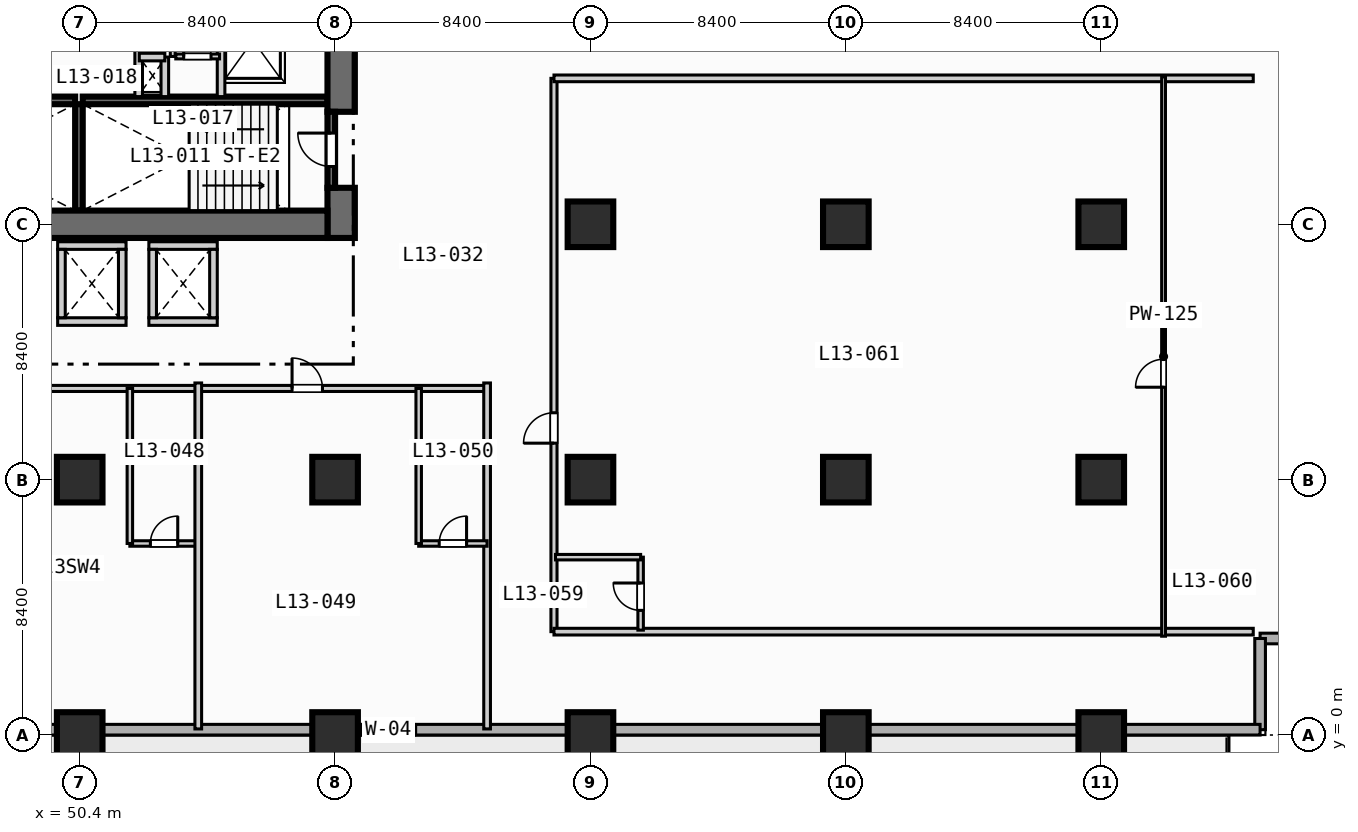
"""IFC4 building model, lengths in metres.
Left out: names, types, materials, properties, quantities, classifications, styles, units other than length and angle.
Written with IfcOpenShell. Run it as: python <this file> out.ifc"""

import sys

from ifc_helpers import new_model, si_unit, direction, frame, frame_2d, origin, origin_2d, place, context, subcontext, project, spatial, rectangle, extrude, element, fill, save


model = new_model("IFC4")
c1 = context("Model", 3, precision=1e-05, world=origin(), true_north=direction((0.0, 1.0)))
c2 = subcontext(c1, "Body", "Model", "MODEL_VIEW")
j1 = project(units=[si_unit("LENGTHUNIT", "METRE"), si_unit("PLANEANGLEUNIT", "RADIAN")], contexts=[c1])
p1 = place(None, origin())
s1 = spatial("IfcSite", under=j1, at=p1, CompositionType="ELEMENT")
p2 = place(p1, origin())
s2 = spatial("IfcBuilding", under=s1, at=p2, CompositionType="ELEMENT")
p3 = place(p2, frame((0.0, 0.0, 58.6)))
s3 = spatial("IfcBuildingStorey", under=s2, at=p3, CompositionType="ELEMENT", Elevation=58.6)
for number, where, z_axis, x_axis in (
    (1, (42.2, 20.875, 0.0), (0.0, 0.0, 1.0), (1.0, 0.0, 0.0)),
    (2, (50.5, 20.875, 0.0), (0.0, 0.0, 1.0), (1.0, 0.0, 0.0)),
):
    element("IfcWall", number, at=place(p3, frame(where, z_axis=z_axis, x_axis=x_axis)), inside=s3, PredefinedType="SOLIDWALL", context=c2, shape_type="SweptSolid", body=[
        extrude(rectangle(XDim=8.05, YDim=0.25, at=frame_2d((4.025, 0.0))), origin(), (0.0, 0.0, 1.0), 3.55),
    ])
p4 = place(p3, frame((50.375, 17.25, 0.0), z_axis=(0.0, 0.0, 1.0), x_axis=(0.0, 1.0, 0.0)))
e3 = element("IfcWall", 3, at=p4, inside=s3, PredefinedType="SOLIDWALL", context=c2, shape_type="SweptSolid", body=[
    extrude(rectangle(XDim=3.5, YDim=0.25, at=frame_2d((1.75, 0.0))), origin(), (0.0, 0.0, 1.0), 3.55),
])
p5 = place(p3, frame((59.0, 16.35, 0.0), z_axis=(0.0, 0.0, 1.0), x_axis=(0.0, 1.0, 0.0)))
e4 = element("IfcWall", 4, at=p5, inside=s3, PredefinedType="SHEAR", context=c2, shape_type="SweptSolid", body=[
    extrude(rectangle(XDim=1.65, YDim=0.9, at=frame_2d((0.825, 0.0))), origin(), (0.0, 0.0, 1.0), 3.55),
])
p6 = place(p3, frame((59.0, 20.5, 0.0), z_axis=(0.0, 0.0, 1.0), x_axis=(0.0, 1.0, 0.0)))
e5 = element("IfcWall", 5, at=p6, inside=s3, PredefinedType="SHEAR", context=c2, shape_type="SweptSolid", body=[
    extrude(rectangle(XDim=5.15, YDim=0.9, at=frame_2d((2.575, 0.0))), origin(), (0.0, 0.0, 1.0), 3.55),
])
p7 = place(p3, frame((42.2, 16.8, 0.0), z_axis=(0.0, 0.0, 1.0), x_axis=(1.0, 0.0, 0.0)))
e6 = element("IfcWall", 6, at=p7, inside=s3, PredefinedType="SHEAR", context=c2, shape_type="SweptSolid", body=[
    extrude(rectangle(XDim=16.35, YDim=0.9, at=frame_2d((8.175, 0.0))), origin(), (0.0, 0.0, 1.0), 3.55),
])
for number, where, z_axis, x_axis in (
    (7, (50.4, 0.0, 0.0), (0.0, 0.0, 1.0), (1.0, 0.0, 0.0)),
    (8, (50.4, 8.4, 0.0), (0.0, 0.0, 1.0), (1.0, 0.0, 0.0)),
    (9, (58.8, 0.0, 0.0), (0.0, 0.0, 1.0), (1.0, 0.0, 0.0)),
    (10, (58.8, 8.4, 0.0), (0.0, 0.0, 1.0), (1.0, 0.0, 0.0)),
    (11, (67.2, 0.0, 0.0), (0.0, 0.0, 1.0), (1.0, 0.0, 0.0)),
    (12, (67.2, 8.4, 0.0), (0.0, 0.0, 1.0), (1.0, 0.0, 0.0)),
    (13, (67.2, 16.8, 0.0), (0.0, 0.0, 1.0), (1.0, 0.0, 0.0)),
    (14, (75.6, 0.0, 0.0), (0.0, 0.0, 1.0), (1.0, 0.0, 0.0)),
    (15, (75.6, 8.4, 0.0), (0.0, 0.0, 1.0), (1.0, 0.0, 0.0)),
    (16, (75.6, 16.8, 0.0), (0.0, 0.0, 1.0), (1.0, 0.0, 0.0)),
    (17, (84.0, 0.0, 0.0), (0.0, 0.0, 1.0), (1.0, 0.0, 0.0)),
    (18, (84.0, 8.4, 0.0), (0.0, 0.0, 1.0), (1.0, 0.0, 0.0)),
    (19, (84.0, 16.8, 0.0), (0.0, 0.0, 1.0), (1.0, 0.0, 0.0)),
):
    element("IfcColumn", number, at=place(p3, frame(where, z_axis=z_axis, x_axis=x_axis)), inside=s3, PredefinedType="COLUMN", context=c2, shape_type="SweptSolid", body=[
        extrude(rectangle(XDim=1.5, YDim=1.5, at=origin_2d()), origin(), (0.0, 0.0, 1.0), 3.8),
    ])
for number, where, z_axis, x_axis in (
    (20, (92.225, 3.175, 0.0), (0.0, 0.0, 1.0), (-1.0, 0.0, 0.0)),
    (21, (89.225, 3.175, 0.0), (0.0, 0.0, 1.0), (0.0, -1.0, 0.0)),
):
    element("IfcWall", number, at=place(p3, frame(where, z_axis=z_axis, x_axis=x_axis)), inside=s3, PredefinedType="STANDARD", context=c2, shape_type="SweptSolid", body=[
        extrude(rectangle(XDim=3.0, YDim=0.35, at=frame_2d((1.5, 0.0))), origin(), (0.0, 0.0, 1.0), 3.55),
    ])
p8 = place(p3, frame((89.225, 0.175, 0.0), z_axis=(0.0, 0.0, 1.0), x_axis=(-1.0, 0.0, 0.0)))
e22 = element("IfcWall", 22, at=p8, inside=s3, PredefinedType="STANDARD", context=c2, shape_type="SweptSolid", body=[
    extrude(rectangle(XDim=86.05, YDim=0.35, at=frame_2d((43.025, 0.0))), origin(), (0.0, 0.0, 1.0), 3.55),
])
p9 = place(p8, frame((69.025, 0.0, 0.0)))
e23 = element("IfcOpeningElement", 23, at=p9, cuts=e22, PredefinedType="OPENING", context=c2, shape_type="SweptSolid", body=[
    extrude(rectangle(XDim=1.4, YDim=2.2, at=frame_2d((0.7, 1.1))), frame((0.0, 0.185, 0.0), z_axis=(0.0, -1.0, 0.0), x_axis=(1.0, 0.0, 0.0)), (0.0, 0.0, 1.0), 0.37),
])
p10 = place(p8, frame((58.725, 0.0, 0.85)))
e24 = element("IfcOpeningElement", 24, at=p10, cuts=e22, PredefinedType="OPENING", context=c2, shape_type="SweptSolid", body=[
    extrude(rectangle(XDim=2.2, YDim=1.8, at=frame_2d((1.1, 0.9))), frame((0.0, 0.185, 0.0), z_axis=(0.0, -1.0, 0.0), x_axis=(1.0, 0.0, 0.0)), (0.0, 0.0, 1.0), 0.37),
])
p11 = place(p8, frame((50.325, 0.0, 0.85)))
e25 = element("IfcOpeningElement", 25, at=p11, cuts=e22, PredefinedType="OPENING", context=c2, shape_type="SweptSolid", body=[
    extrude(rectangle(XDim=2.2, YDim=1.8, at=frame_2d((1.1, 0.9))), frame((0.0, 0.185, 0.0), z_axis=(0.0, -1.0, 0.0), x_axis=(1.0, 0.0, 0.0)), (0.0, 0.0, 1.0), 0.37),
])
p12 = place(p8, frame((41.925, 0.0, 0.85)))
e26 = element("IfcOpeningElement", 26, at=p12, cuts=e22, PredefinedType="OPENING", context=c2, shape_type="SweptSolid", body=[
    extrude(rectangle(XDim=2.2, YDim=1.8, at=frame_2d((1.1, 0.9))), frame((0.0, 0.185, 0.0), z_axis=(0.0, -1.0, 0.0), x_axis=(1.0, 0.0, 0.0)), (0.0, 0.0, 1.0), 0.37),
])
p13 = place(p8, frame((27.775, 0.0, 0.85)))
e27 = element("IfcOpeningElement", 27, at=p13, cuts=e22, PredefinedType="OPENING", context=c2, shape_type="SweptSolid", body=[
    extrude(rectangle(XDim=1.8, YDim=1.8, at=frame_2d((0.9, 0.9))), frame((0.0, 0.185, 0.0), z_axis=(0.0, -1.0, 0.0), x_axis=(1.0, 0.0, 0.0)), (0.0, 0.0, 1.0), 0.37),
])
p14 = place(p3, frame((58.675, 18.0, 0.0), z_axis=(0.0, 0.0, 1.0), x_axis=(0.0, 1.0, 0.0)))
e28 = element("IfcWall", 28, at=p14, inside=s3, PredefinedType="SOLIDWALL", context=c2, shape_type="SweptSolid", body=[
    extrude(rectangle(XDim=2.5, YDim=0.25, at=frame_2d((1.25, 0.0))), origin(), (0.0, 0.0, 1.0), 3.55),
])
p15 = place(p14, frame((0.7, 0.0, 0.0)))
e29 = element("IfcOpeningElement", 29, at=p15, cuts=e28, PredefinedType="OPENING", context=c2, shape_type="SweptSolid", body=[
    extrude(rectangle(XDim=1.1, YDim=2.15, at=frame_2d((0.55, 1.075))), frame((0.0, 0.135, 0.0), z_axis=(0.0, -1.0, 0.0), x_axis=(1.0, 0.0, 0.0)), (0.0, 0.0, 1.0), 0.27),
])
p16 = place(p3, frame((52.34, 21.0, 0.0), z_axis=(0.0, 0.0, 1.0), x_axis=(0.0, 1.0, 0.0)))
e30 = element("IfcWall", 30, at=p16, inside=s3, PredefinedType="SOLIDWALL", context=c2, shape_type="SweptSolid", body=[
    extrude(rectangle(XDim=3.75, YDim=0.25, at=frame_2d((1.875, 0.0))), origin(), (0.0, 0.0, 1.0), 3.55),
])
p17 = place(p3, frame((55.05, 21.0, 0.0), z_axis=(0.0, 0.0, 1.0), x_axis=(0.0, 1.0, 0.0)))
e31 = element("IfcWall", 31, at=p17, inside=s3, PredefinedType="SOLIDWALL", context=c2, shape_type="SweptSolid", body=[
    extrude(rectangle(XDim=4.15, YDim=0.25, at=frame_2d((2.075, 0.0))), origin(), (0.0, 0.0, 1.0), 3.55),
])
p18 = place(p17, frame((1.85, 0.0, 0.0)))
e32 = element("IfcOpeningElement", 32, at=p18, cuts=e31, PredefinedType="OPENING", context=c2, shape_type="SweptSolid", body=[
    extrude(rectangle(XDim=1.1, YDim=2.15, at=frame_2d((0.55, 1.075))), frame((0.0, 0.135, 0.0), z_axis=(0.0, -1.0, 0.0), x_axis=(1.0, 0.0, 0.0)), (0.0, 0.0, 1.0), 0.27),
])
p19 = place(p3, frame((53.2, 21.0, 0.0), z_axis=(0.0, 0.0, 1.0), x_axis=(0.0, 1.0, 0.0)))
e33 = element("IfcWall", 33, at=p19, inside=s3, PredefinedType="SOLIDWALL", context=c2, shape_type="SweptSolid", body=[
    extrude(rectangle(XDim=1.3, YDim=0.25, at=frame_2d((0.65, 0.0))), origin(), (0.0, 0.0, 1.0), 3.55),
])
p20 = place(p3, frame((52.36, 22.3, 0.0), z_axis=(0.0, 0.0, 1.0), x_axis=(1.0, 0.0, 0.0)))
e34 = element("IfcWall", 34, at=p20, inside=s3, PredefinedType="SOLIDWALL", context=c2, shape_type="SweptSolid", body=[
    extrude(rectangle(XDim=0.84, YDim=0.25, at=frame_2d((0.42, 0.0))), origin(), (0.0, 0.0, 1.0), 3.55),
])
p21 = place(p3, frame((53.56, 22.32, 0.0), z_axis=(0.0, 0.0, 1.0), x_axis=(1.0, 0.0, 0.0)))
e35 = element("IfcWall", 35, at=p21, inside=s3, PredefinedType="PARTITIONING", context=c2, shape_type="SweptSolid", body=[
    extrude(rectangle(XDim=1.44, YDim=0.16, at=frame_2d((0.72, 0.0))), origin(), (0.0, 0.0, 1.0), 3.55),
])
p22 = place(p21, frame((0.26, 0.0, 0.0)))
e36 = element("IfcOpeningElement", 36, at=p22, cuts=e35, PredefinedType="OPENING", context=c2, shape_type="SweptSolid", body=[
    extrude(rectangle(XDim=0.9, YDim=2.1, at=frame_2d((0.45, 1.05))), frame((0.0, 0.09, 0.0), z_axis=(0.0, -1.0, 0.0), x_axis=(1.0, 0.0, 0.0)), (0.0, 0.0, 1.0), 0.18),
])
p23 = place(p3, frame((53.46, 22.32, 0.0), z_axis=(0.0, 0.0, 1.0), x_axis=(0.0, 1.0, 0.0)))
e37 = element("IfcWall", 37, at=p23, inside=s3, PredefinedType="PARTITIONING", context=c2, shape_type="SweptSolid", body=[
    extrude(rectangle(XDim=2.4, YDim=0.16, at=frame_2d((1.2, 0.0))), origin(), (0.0, 0.0, 1.0), 3.55),
])
p24 = place(p23, frame((0.65, 0.0, 0.0)))
e38 = element("IfcOpeningElement", 38, at=p24, cuts=e37, PredefinedType="OPENING", context=c2, shape_type="SweptSolid", body=[
    extrude(rectangle(XDim=0.9, YDim=2.1, at=frame_2d((0.45, 1.05))), frame((0.0, 0.09, 0.0), z_axis=(0.0, -1.0, 0.0), x_axis=(1.0, 0.0, 0.0)), (0.0, 0.0, 1.0), 0.18),
])
for number, where, z_axis, x_axis in (
    (39, (49.675, 13.6, 0.0), (0.0, 0.0, 1.0), (1.0, 0.0, 0.0)),
    (40, (49.675, 16.1, 0.0), (0.0, 0.0, 1.0), (1.0, 0.0, 0.0)),
    (41, (49.8, 13.725, 0.0), (0.0, 0.0, 1.0), (0.0, 1.0, 0.0)),
    (42, (51.8, 13.725, 0.0), (0.0, 0.0, 1.0), (0.0, 1.0, 0.0)),
    (43, (52.675, 13.6, 0.0), (0.0, 0.0, 1.0), (1.0, 0.0, 0.0)),
    (44, (52.675, 16.1, 0.0), (0.0, 0.0, 1.0), (1.0, 0.0, 0.0)),
    (45, (52.8, 13.725, 0.0), (0.0, 0.0, 1.0), (0.0, 1.0, 0.0)),
    (46, (54.8, 13.725, 0.0), (0.0, 0.0, 1.0), (0.0, 1.0, 0.0)),
):
    element("IfcWall", number, at=place(p3, frame(where, z_axis=z_axis, x_axis=x_axis)), inside=s3, PredefinedType="SOLIDWALL", context=c2, shape_type="SweptSolid", body=[
        extrude(rectangle(XDim=2.25, YDim=0.25, at=frame_2d((1.125, 0.0))), origin(), (0.0, 0.0, 1.0), 3.55),
    ])
p25 = place(p3, frame((13.5, 11.4, 0.0), z_axis=(0.0, 0.0, 1.0), x_axis=(1.0, 0.0, 0.0)))
e47 = element("IfcWall", 47, at=p25, inside=s3, PredefinedType="PARTITIONING", context=c2, shape_type="SweptSolid", body=[
    extrude(rectangle(XDim=50.3, YDim=0.2, at=frame_2d((25.15, 0.0))), origin(), (0.0, 0.0, 1.0), 3.55),
])
p26 = place(p25, frame((2.135, 0.0, 0.0)))
e48 = element("IfcOpeningElement", 48, at=p26, cuts=e47, PredefinedType="OPENING", context=c2, shape_type="SweptSolid", body=[
    extrude(rectangle(XDim=1.0, YDim=2.15, at=frame_2d((0.5, 1.075))), frame((0.0, 0.11, 0.0), z_axis=(0.0, -1.0, 0.0), x_axis=(1.0, 0.0, 0.0)), (0.0, 0.0, 1.0), 0.22),
])
p27 = place(p25, frame((14.665, 0.0, 0.0)))
e49 = element("IfcOpeningElement", 49, at=p27, cuts=e47, PredefinedType="OPENING", context=c2, shape_type="SweptSolid", body=[
    extrude(rectangle(XDim=1.0, YDim=2.15, at=frame_2d((0.5, 1.075))), frame((0.0, 0.11, 0.0), z_axis=(0.0, -1.0, 0.0), x_axis=(1.0, 0.0, 0.0)), (0.0, 0.0, 1.0), 0.22),
])
p28 = place(p25, frame((22.31, 0.0, 0.0)))
e50 = element("IfcOpeningElement", 50, at=p28, cuts=e47, PredefinedType="OPENING", context=c2, shape_type="SweptSolid", body=[
    extrude(rectangle(XDim=1.0, YDim=2.15, at=frame_2d((0.5, 1.075))), frame((0.0, 0.11, 0.0), z_axis=(0.0, -1.0, 0.0), x_axis=(1.0, 0.0, 0.0)), (0.0, 0.0, 1.0), 0.22),
])
p29 = place(p25, frame((32.51, 0.0, 0.0)))
e51 = element("IfcOpeningElement", 51, at=p29, cuts=e47, PredefinedType="OPENING", context=c2, shape_type="SweptSolid", body=[
    extrude(rectangle(XDim=1.0, YDim=2.15, at=frame_2d((0.5, 1.075))), frame((0.0, 0.11, 0.0), z_axis=(0.0, -1.0, 0.0), x_axis=(1.0, 0.0, 0.0)), (0.0, 0.0, 1.0), 0.22),
])
p30 = place(p25, frame((43.885, 0.0, 0.0)))
e52 = element("IfcOpeningElement", 52, at=p30, cuts=e47, PredefinedType="OPENING", context=c2, shape_type="SweptSolid", body=[
    extrude(rectangle(XDim=1.0, YDim=2.15, at=frame_2d((0.5, 1.075))), frame((0.0, 0.11, 0.0), z_axis=(0.0, -1.0, 0.0), x_axis=(1.0, 0.0, 0.0)), (0.0, 0.0, 1.0), 0.22),
])
p31 = place(p3, frame((52.05, 6.3, 0.0), z_axis=(0.0, 0.0, 1.0), x_axis=(1.0, 0.0, 0.0)))
e53 = element("IfcWall", 53, at=p31, inside=s3, PredefinedType="PLUMBINGWALL", context=c2, shape_type="SweptSolid", body=[
    extrude(rectangle(XDim=2.25, YDim=0.18, at=frame_2d((1.125, 0.0))), origin(), (0.0, 0.0, 1.0), 3.55),
])
p32 = place(p31, frame((0.675, 0.0, 0.0)))
e54 = element("IfcOpeningElement", 54, at=p32, cuts=e53, PredefinedType="OPENING", context=c2, shape_type="SweptSolid", body=[
    extrude(rectangle(XDim=0.9, YDim=2.1, at=frame_2d((0.45, 1.05))), frame((0.0, 0.1, 0.0), z_axis=(0.0, -1.0, 0.0), x_axis=(1.0, 0.0, 0.0)), (0.0, 0.0, 1.0), 0.2),
])
p33 = place(p3, frame((52.05, 6.3, 0.0), z_axis=(0.0, 0.0, 1.0), x_axis=(0.0, 1.0, 0.0)))
e55 = element("IfcWall", 55, at=p33, inside=s3, PredefinedType="PLUMBINGWALL", context=c2, shape_type="SweptSolid", body=[
    extrude(rectangle(XDim=5.1, YDim=0.18, at=frame_2d((2.55, 0.0))), origin(), (0.0, 0.0, 1.0), 3.55),
])
for number, where, z_axis, x_axis in (
    (56, (54.3, 0.2, 0.0), (0.0, 0.0, 1.0), (0.0, 1.0, 0.0)),
    (57, (63.8, 0.2, 0.0), (0.0, 0.0, 1.0), (0.0, 1.0, 0.0)),
):
    element("IfcWall", number, at=place(p3, frame(where, z_axis=z_axis, x_axis=x_axis)), inside=s3, PredefinedType="PARTITIONING", context=c2, shape_type="SweptSolid", body=[
        extrude(rectangle(XDim=11.38, YDim=0.22, at=frame_2d((5.69, 0.0))), origin(), (0.0, 0.0, 1.0), 3.55),
    ])
p34 = place(p3, frame((61.55, 6.3, 0.0), z_axis=(0.0, 0.0, 1.0), x_axis=(1.0, 0.0, 0.0)))
e58 = element("IfcWall", 58, at=p34, inside=s3, PredefinedType="PLUMBINGWALL", context=c2, shape_type="SweptSolid", body=[
    extrude(rectangle(XDim=2.25, YDim=0.18, at=frame_2d((1.125, 0.0))), origin(), (0.0, 0.0, 1.0), 3.55),
])
p35 = place(p34, frame((0.675, 0.0, 0.0)))
e59 = element("IfcOpeningElement", 59, at=p35, cuts=e58, PredefinedType="OPENING", context=c2, shape_type="SweptSolid", body=[
    extrude(rectangle(XDim=0.9, YDim=2.1, at=frame_2d((0.45, 1.05))), frame((0.0, 0.1, 0.0), z_axis=(0.0, -1.0, 0.0), x_axis=(1.0, 0.0, 0.0)), (0.0, 0.0, 1.0), 0.2),
])
p36 = place(p3, frame((61.55, 6.3, 0.0), z_axis=(0.0, 0.0, 1.0), x_axis=(0.0, 1.0, 0.0)))
e60 = element("IfcWall", 60, at=p36, inside=s3, PredefinedType="PLUMBINGWALL", context=c2, shape_type="SweptSolid", body=[
    extrude(rectangle(XDim=5.1, YDim=0.18, at=frame_2d((2.55, 0.0))), origin(), (0.0, 0.0, 1.0), 3.55),
])
p37 = place(p3, frame((66.0, 3.4, 0.0), z_axis=(0.0, 0.0, 1.0), x_axis=(0.0, 1.0, 0.0)))
e61 = element("IfcWall", 61, at=p37, inside=s3, PredefinedType="PARTITIONING", context=c2, shape_type="SweptSolid", body=[
    extrude(rectangle(XDim=18.2, YDim=0.2, at=frame_2d((9.1, 0.0))), origin(), (0.0, 0.0, 1.0), 3.55),
])
p38 = place(p37, frame((6.2, 0.0, 0.0)))
e62 = element("IfcOpeningElement", 62, at=p38, cuts=e61, PredefinedType="OPENING", context=c2, shape_type="SweptSolid", body=[
    extrude(rectangle(XDim=1.0, YDim=2.15, at=frame_2d((0.5, 1.075))), frame((0.0, 0.11, 0.0), z_axis=(0.0, -1.0, 0.0), x_axis=(1.0, 0.0, 0.0)), (0.0, 0.0, 1.0), 0.22),
])
for number, where, z_axis, x_axis in (
    (63, (66.0, 3.4, 0.0), (0.0, 0.0, 1.0), (1.0, 0.0, 0.0)),
    (64, (66.0, 21.6, 0.0), (0.0, 0.0, 1.0), (1.0, 0.0, 0.0)),
):
    element("IfcWall", number, at=place(p3, frame(where, z_axis=z_axis, x_axis=x_axis)), inside=s3, PredefinedType="PARTITIONING", context=c2, shape_type="SweptSolid", body=[
        extrude(rectangle(XDim=23.0, YDim=0.22, at=frame_2d((11.5, 0.0))), origin(), (0.0, 0.0, 1.0), 3.55),
    ])
p39 = place(p3, frame((68.85, 3.45, 0.0), z_axis=(0.0, 0.0, 1.0), x_axis=(0.0, 1.0, 0.0)))
e65 = element("IfcWall", 65, at=p39, inside=s3, PredefinedType="PLUMBINGWALL", context=c2, shape_type="SweptSolid", body=[
    extrude(rectangle(XDim=2.4, YDim=0.18, at=frame_2d((1.2, 0.0))), origin(), (0.0, 0.0, 1.0), 3.55),
])
p40 = place(p39, frame((0.65, 0.0, 0.0)))
e66 = element("IfcOpeningElement", 66, at=p40, cuts=e65, PredefinedType="OPENING", context=c2, shape_type="SweptSolid", body=[
    extrude(rectangle(XDim=0.9, YDim=2.1, at=frame_2d((0.45, 1.05))), frame((0.0, 0.1, 0.0), z_axis=(0.0, -1.0, 0.0), x_axis=(1.0, 0.0, 0.0)), (0.0, 0.0, 1.0), 0.2),
])
p41 = place(p3, frame((66.05, 5.85, 0.0), z_axis=(0.0, 0.0, 1.0), x_axis=(1.0, 0.0, 0.0)))
e67 = element("IfcWall", 67, at=p41, inside=s3, PredefinedType="PLUMBINGWALL", context=c2, shape_type="SweptSolid", body=[
    extrude(rectangle(XDim=2.8, YDim=0.18, at=frame_2d((1.4, 0.0))), origin(), (0.0, 0.0, 1.0), 3.55),
])
p42 = place(p3, frame((86.05, 3.25, 0.0), z_axis=(0.0, 0.0, 1.0), x_axis=(0.0, 1.0, 0.0)))
e68 = element("IfcWall", 68, at=p42, inside=s3, PredefinedType="PARTITIONING", context=c2, shape_type="SweptSolid", body=[
    extrude(rectangle(XDim=18.4, YDim=0.125, at=frame_2d((9.2, 0.0))), origin(), (0.0, 0.0, 1.0), 3.55),
])
p43 = place(p42, frame((8.19, 0.0, 0.0)))
e69 = element("IfcOpeningElement", 69, at=p43, cuts=e68, PredefinedType="OPENING", context=c2, shape_type="SweptSolid", body=[
    extrude(rectangle(XDim=0.92, YDim=2.1, at=frame_2d((0.46, 1.05))), frame((0.0, 0.073, 0.0), z_axis=(0.0, -1.0, 0.0), x_axis=(1.0, 0.0, 0.0)), (0.0, 0.0, 1.0), 0.145),
])
p44 = place(p13, origin())
e70 = element("IfcWindow", 70, at=p44, inside=s3, PartitioningType="SINGLE_PANEL", PredefinedType="WINDOW", context=c2, shape_type="SweptSolid", body=[
    extrude(rectangle(XDim=1.8, YDim=1.8, at=frame_2d((0.9, 0.9))), frame((0.0, 0.03, 0.0), z_axis=(0.0, -1.0, 0.0), x_axis=(1.0, 0.0, 0.0)), (0.0, 0.0, 1.0), 0.06),
])
fill(e27, e70)
p45 = place(p15, origin())
e71 = element("IfcDoor", 71, at=p45, inside=s3, OperationType="SINGLE_SWING_RIGHT", PredefinedType="DOOR", context=c2, shape_type="SweptSolid", body=[
    extrude(rectangle(XDim=1.1, YDim=2.15, at=frame_2d((0.55, 1.075))), frame((0.0, 0.025, 0.0), z_axis=(0.0, -1.0, 0.0), x_axis=(1.0, 0.0, 0.0)), (0.0, 0.0, 1.0), 0.05),
])
fill(e29, e71)
p46 = place(p22, origin())
e72 = element("IfcDoor", 72, at=p46, inside=s3, OperationType="SINGLE_SWING_LEFT", PredefinedType="DOOR", context=c2, shape_type="SweptSolid", body=[
    extrude(rectangle(XDim=0.9, YDim=2.1, at=frame_2d((0.45, 1.05))), frame((0.0, 0.025, 0.0), z_axis=(0.0, -1.0, 0.0), x_axis=(1.0, 0.0, 0.0)), (0.0, 0.0, 1.0), 0.05),
])
fill(e36, e72)
p47 = place(p30, origin())
e73 = element("IfcDoor", 73, at=p47, inside=s3, OperationType="SINGLE_SWING_LEFT", PredefinedType="DOOR", context=c2, shape_type="SweptSolid", body=[
    extrude(rectangle(XDim=1.0, YDim=2.15, at=frame_2d((0.5, 1.075))), frame((0.0, 0.025, 0.0), z_axis=(0.0, -1.0, 0.0), x_axis=(1.0, 0.0, 0.0)), (0.0, 0.0, 1.0), 0.05),
])
fill(e52, e73)
p48 = place(p32, origin())
e74 = element("IfcDoor", 74, at=p48, inside=s3, OperationType="SINGLE_SWING_RIGHT", PredefinedType="DOOR", context=c2, shape_type="SweptSolid", body=[
    extrude(rectangle(XDim=0.9, YDim=2.1, at=frame_2d((0.45, 1.05))), frame((0.0, 0.025, 0.0), z_axis=(0.0, -1.0, 0.0), x_axis=(1.0, 0.0, 0.0)), (0.0, 0.0, 1.0), 0.05),
])
fill(e54, e74)
p49 = place(p35, origin())
e75 = element("IfcDoor", 75, at=p49, inside=s3, OperationType="SINGLE_SWING_RIGHT", PredefinedType="DOOR", context=c2, shape_type="SweptSolid", body=[
    extrude(rectangle(XDim=0.9, YDim=2.1, at=frame_2d((0.45, 1.05))), frame((0.0, 0.025, 0.0), z_axis=(0.0, -1.0, 0.0), x_axis=(1.0, 0.0, 0.0)), (0.0, 0.0, 1.0), 0.05),
])
fill(e59, e75)
p50 = place(p38, origin())
e76 = element("IfcDoor", 76, at=p50, inside=s3, OperationType="SINGLE_SWING_LEFT", PredefinedType="DOOR", context=c2, shape_type="SweptSolid", body=[
    extrude(rectangle(XDim=1.0, YDim=2.15, at=frame_2d((0.5, 1.075))), frame((0.0, 0.025, 0.0), z_axis=(0.0, -1.0, 0.0), x_axis=(1.0, 0.0, 0.0)), (0.0, 0.0, 1.0), 0.05),
])
fill(e62, e76)
p51 = place(p40, origin())
e77 = element("IfcDoor", 77, at=p51, inside=s3, OperationType="SINGLE_SWING_RIGHT", PredefinedType="DOOR", context=c2, shape_type="SweptSolid", body=[
    extrude(rectangle(XDim=0.9, YDim=2.1, at=frame_2d((0.45, 1.05))), frame((0.0, 0.025, 0.0), z_axis=(0.0, -1.0, 0.0), x_axis=(1.0, 0.0, 0.0)), (0.0, 0.0, 1.0), 0.05),
])
fill(e66, e77)
p52 = place(p43, origin())
e78 = element("IfcDoor", 78, at=p52, inside=s3, OperationType="SINGLE_SWING_LEFT", PredefinedType="DOOR", context=c2, shape_type="SweptSolid", body=[
    extrude(rectangle(XDim=0.92, YDim=2.1, at=frame_2d((0.46, 1.05))), frame((0.0, 0.025, 0.0), z_axis=(0.0, -1.0, 0.0), x_axis=(1.0, 0.0, 0.0)), (0.0, 0.0, 1.0), 0.05),
])
fill(e69, e78)
save(model, sys.argv[1])
